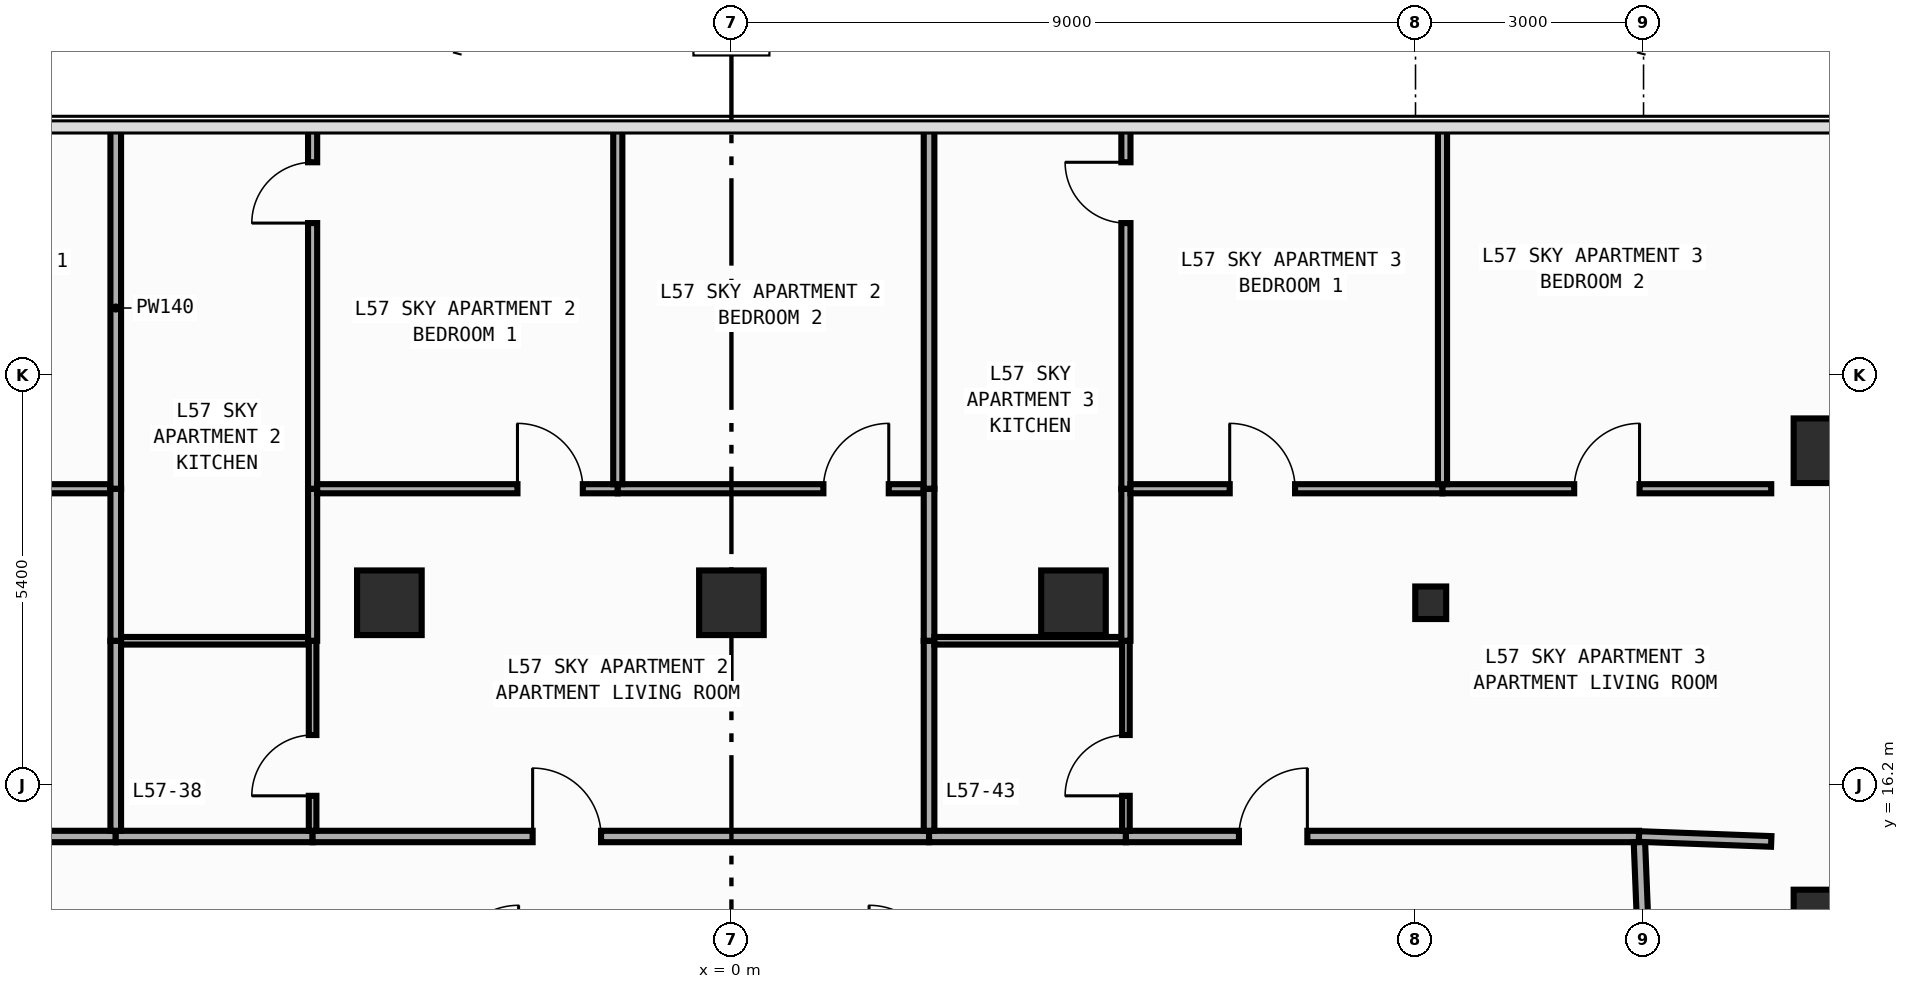
"""IFC4 building model, lengths in metres.
Left out: names, types, materials, properties, quantities, classifications, styles, units other than length and angle.
Written with IfcOpenShell. Run it as: python <this file> out.ifc"""

import sys

from ifc_helpers import new_model, si_unit, direction, frame, frame_2d, origin, origin_2d, place, context, subcontext, project, spatial, rectangle, i_section, extrude, element, fill, save


model = new_model("IFC4")
c1 = context("Model", 3, precision=1e-05, world=origin(), true_north=direction((0.0, 1.0)))
c2 = subcontext(c1, "Body", "Model", "MODEL_VIEW")
j1 = project(units=[si_unit("LENGTHUNIT", "METRE"), si_unit("PLANEANGLEUNIT", "RADIAN")], contexts=[c1])
p1 = place(None, origin())
s1 = spatial("IfcSite", under=j1, at=p1, CompositionType="ELEMENT")
p2 = place(p1, origin())
s2 = spatial("IfcBuilding", under=s1, at=p2, CompositionType="ELEMENT")
p3 = place(p2, frame((0.0, 0.0, 244.0)))
s3 = spatial("IfcBuildingStorey", under=s2, at=p3, CompositionType="ELEMENT", Elevation=244.0)
p4 = place(p3, frame((9.2, 18.6, 0.0), z_axis=(0.0, 0.0, 1.0), x_axis=(1.0, 0.0, 0.0)))
e1 = element("IfcColumn", 1, at=p4, inside=s3, PredefinedType="COLUMN", context=c2, shape_type="SweptSolid", body=[
    extrude(i_section(OverallWidth=0.407, OverallDepth=0.428, WebThickness=0.02, FlangeThickness=0.035, FilletRadius=0.022, at=origin_2d()), origin(), (0.0, 0.0, 1.0), 3.6),
])
for number, where, z_axis, x_axis in (
    (2, (14.4, 14.4, 0.0), (0.0, 0.0, 1.0), (1.0, 0.0, 0.0)),
    (3, (-4.5, 18.6, 0.0), (0.0, 0.0, 1.0), (1.0, 0.0, 0.0)),
    (4, (0.0, 18.6, 0.0), (0.0, 0.0, 1.0), (1.0, 0.0, 0.0)),
    (5, (4.5, 18.6, 0.0), (0.0, 0.0, 1.0), (1.0, 0.0, 0.0)),
    (6, (14.4, 20.6, 0.0), (0.0, 0.0, 1.0), (1.0, 0.0, 0.0)),
):
    element("IfcColumn", number, at=place(p3, frame(where, z_axis=z_axis, x_axis=x_axis)), inside=s3, PredefinedType="COLUMN", context=c2, shape_type="SweptSolid", body=[
        extrude(rectangle(XDim=0.85, YDim=0.85, at=origin_2d()), origin(), (0.0, 0.0, 1.0), 3.6),
    ])
p5 = place(p3, frame((-19.31, 15.525, 0.0), z_axis=(0.0, 0.0, 1.0), x_axis=(1.0, 0.0, 0.0)))
e7 = element("IfcWall", 7, at=p5, inside=s3, PredefinedType="PARTITIONING", context=c2, shape_type="SweptSolid", body=[
    extrude(rectangle(XDim=11.21, YDim=0.15, at=frame_2d((5.605, 0.0))), origin(), (0.0, 0.0, 1.0), 3.34),
])
p6 = place(p5, frame((1.481, 0.0, 0.0)))
e8 = element("IfcOpeningElement", 8, at=p6, cuts=e7, PredefinedType="OPENING", context=c2, shape_type="SweptSolid", body=[
    extrude(rectangle(XDim=0.9, YDim=2.15, at=frame_2d((0.45, 1.075))), frame((0.0, 0.085, 0.0), z_axis=(0.0, -1.0, 0.0), x_axis=(1.0, 0.0, 0.0)), (0.0, 0.0, 1.0), 0.17),
])
p7 = place(p3, frame((-8.1, 15.525, 0.0), z_axis=(0.0, 0.0, 1.0), x_axis=(1.0, 0.0, 0.0)))
e9 = element("IfcWall", 9, at=p7, inside=s3, PredefinedType="PARTITIONING", context=c2, shape_type="SweptSolid", body=[
    extrude(rectangle(XDim=2.59, YDim=0.15, at=frame_2d((1.295, 0.0))), origin(), (0.0, 0.0, 1.0), 3.34),
])
p8 = place(p3, frame((-5.51, 15.525, 0.0), z_axis=(0.0, 0.0, 1.0), x_axis=(1.0, 0.0, 0.0)))
e10 = element("IfcWall", 10, at=p8, inside=s3, PredefinedType="PARTITIONING", context=c2, shape_type="SweptSolid", body=[
    extrude(rectangle(XDim=8.11, YDim=0.15, at=frame_2d((4.055, 0.0))), origin(), (0.0, 0.0, 1.0), 3.34),
])
p9 = place(p8, frame((2.895, 0.0, 0.0)))
e11 = element("IfcOpeningElement", 11, at=p9, cuts=e10, PredefinedType="OPENING", context=c2, shape_type="SweptSolid", body=[
    extrude(rectangle(XDim=0.9, YDim=2.15, at=frame_2d((0.45, 1.075))), frame((0.0, 0.085, 0.0), z_axis=(0.0, -1.0, 0.0), x_axis=(1.0, 0.0, 0.0)), (0.0, 0.0, 1.0), 0.17),
])
p10 = place(p3, frame((2.6, 15.525, 0.0), z_axis=(0.0, 0.0, 1.0), x_axis=(1.0, 0.0, 0.0)))
e12 = element("IfcWall", 12, at=p10, inside=s3, PredefinedType="PARTITIONING", context=c2, shape_type="SweptSolid", body=[
    extrude(rectangle(XDim=2.59, YDim=0.15, at=frame_2d((1.295, 0.0))), origin(), (0.0, 0.0, 1.0), 3.34),
])
p11 = place(p3, frame((5.19, 15.525, 0.0), z_axis=(0.0, 0.0, 1.0), x_axis=(1.0, 0.0, 0.0)))
e13 = element("IfcWall", 13, at=p11, inside=s3, PredefinedType="PARTITIONING", context=c2, shape_type="SweptSolid", body=[
    extrude(rectangle(XDim=6.75, YDim=0.15, at=frame_2d((3.375, 0.0))), origin(), (0.0, 0.0, 1.0), 3.34),
])
p12 = place(p11, frame((1.487, 0.0, 0.0)))
e14 = element("IfcOpeningElement", 14, at=p12, cuts=e13, PredefinedType="OPENING", context=c2, shape_type="SweptSolid", body=[
    extrude(rectangle(XDim=0.9, YDim=2.15, at=frame_2d((0.45, 1.075))), frame((0.0, 0.085, 0.0), z_axis=(0.0, -1.0, 0.0), x_axis=(1.0, 0.0, 0.0)), (0.0, 0.0, 1.0), 0.17),
])
p13 = place(p3, frame((12.015, 13.72, 0.0), z_axis=(0.0, 0.0, 1.0), x_axis=(-0.040046877756, 0.99919780203, 0.0)))
e15 = element("IfcWall", 15, at=p13, inside=s3, PredefinedType="PARTITIONING", context=c2, shape_type="SweptSolid", body=[
    extrude(rectangle(XDim=1.731, YDim=0.15, at=frame_2d((0.866, 0.0))), origin(), (0.0, 0.0, 1.0), 3.34),
])
p14 = place(p3, frame((-13.745, 20.1, 0.0), z_axis=(0.0, 0.0, 1.0), x_axis=(1.0, 0.0, 0.0)))
e16 = element("IfcWall", 16, at=p14, inside=s3, PredefinedType="PARTITIONING", context=c2, shape_type="SweptSolid", body=[
    extrude(rectangle(XDim=5.575, YDim=0.12, at=frame_2d((2.788, 0.0))), origin(), (0.0, 0.0, 1.0), 3.34),
])
p15 = place(p14, frame((1.725, 0.0, 0.0)))
e17 = element("IfcOpeningElement", 17, at=p15, cuts=e16, PredefinedType="OPENING", context=c2, shape_type="SweptSolid", body=[
    extrude(rectangle(XDim=0.86, YDim=2.15, at=frame_2d((0.43, 1.075))), frame((0.0, 0.07, 0.0), z_axis=(0.0, -1.0, 0.0), x_axis=(1.0, 0.0, 0.0)), (0.0, 0.0, 1.0), 0.14),
])
p16 = place(p3, frame((-8.1, 15.6, 0.0), z_axis=(0.0, 0.0, 1.0), x_axis=(0.0, 1.0, 0.0)))
e18 = element("IfcWall", 18, at=p16, inside=s3, PredefinedType="PARTITIONING", context=c2, shape_type="SweptSolid", body=[
    extrude(rectangle(XDim=2.5, YDim=0.14, at=frame_2d((1.25, 0.0))), origin(), (0.0, 0.0, 1.0), 3.34),
])
p17 = place(p3, frame((-8.1, 18.1, 0.0), z_axis=(0.0, 0.0, 1.0), x_axis=(0.0, 1.0, 0.0)))
e19 = element("IfcWall", 19, at=p17, inside=s3, PredefinedType="PARTITIONING", context=c2, shape_type="SweptSolid", body=[
    extrude(rectangle(XDim=2.0, YDim=0.14, at=frame_2d((1.0, 0.0))), origin(), (0.0, 0.0, 1.0), 3.34),
])
p18 = place(p3, frame((-8.1, 20.1, 0.0), z_axis=(0.0, 0.0, 1.0), x_axis=(0.0, 1.0, 0.0)))
e20 = element("IfcWall", 20, at=p18, inside=s3, PredefinedType="PARTITIONING", context=c2, shape_type="SweptSolid", body=[
    extrude(rectangle(XDim=4.755, YDim=0.14, at=frame_2d((2.377, 0.0))), origin(), (0.0, 0.0, 1.0), 3.34),
])
p19 = place(p3, frame((-8.03, 18.1, 0.0), z_axis=(0.0, 0.0, 1.0), x_axis=(1.0, 0.0, 0.0)))
e21 = element("IfcWall", 21, at=p19, inside=s3, PredefinedType="PARTITIONING", context=c2, shape_type="SweptSolid", body=[
    extrude(rectangle(XDim=2.47, YDim=0.1, at=frame_2d((1.235, 0.0))), origin(), (0.0, 0.0, 1.0), 3.34),
])
p20 = place(p3, frame((-5.51, 15.6, 0.0), z_axis=(0.0, 0.0, 1.0), x_axis=(0.0, 1.0, 0.0)))
e22 = element("IfcWall", 22, at=p20, inside=s3, PredefinedType="PARTITIONING", context=c2, shape_type="SweptSolid", body=[
    extrude(rectangle(XDim=2.5, YDim=0.1, at=frame_2d((1.25, 0.0))), origin(), (0.0, 0.0, 1.0), 3.34),
])
p21 = place(p20, frame((0.46, 0.0, 0.0)))
e23 = element("IfcOpeningElement", 23, at=p21, cuts=e22, PredefinedType="OPENING", context=c2, shape_type="SweptSolid", body=[
    extrude(rectangle(XDim=0.8, YDim=2.1, at=frame_2d((0.4, 1.05))), frame((0.0, 0.06, 0.0), z_axis=(0.0, -1.0, 0.0), x_axis=(1.0, 0.0, 0.0)), (0.0, 0.0, 1.0), 0.12),
])
p22 = place(p3, frame((-5.51, 18.1, 0.0), z_axis=(0.0, 0.0, 1.0), x_axis=(0.0, 1.0, 0.0)))
e24 = element("IfcWall", 24, at=p22, inside=s3, PredefinedType="PARTITIONING", context=c2, shape_type="SweptSolid", body=[
    extrude(rectangle(XDim=2.0, YDim=0.12, at=frame_2d((1.0, 0.0))), origin(), (0.0, 0.0, 1.0), 3.34),
])
p23 = place(p3, frame((-5.51, 20.1, 0.0), z_axis=(0.0, 0.0, 1.0), x_axis=(0.0, 1.0, 0.0)))
e25 = element("IfcWall", 25, at=p23, inside=s3, PredefinedType="PARTITIONING", context=c2, shape_type="SweptSolid", body=[
    extrude(rectangle(XDim=4.755, YDim=0.12, at=frame_2d((2.377, 0.0))), origin(), (0.0, 0.0, 1.0), 3.34),
])
p24 = place(p23, frame((3.495, 0.0, 0.0)))
e26 = element("IfcOpeningElement", 26, at=p24, cuts=e25, PredefinedType="OPENING", context=c2, shape_type="SweptSolid", body=[
    extrude(rectangle(XDim=0.8, YDim=2.1, at=frame_2d((0.4, 1.05))), frame((0.0, 0.07, 0.0), z_axis=(0.0, -1.0, 0.0), x_axis=(1.0, 0.0, 0.0)), (0.0, 0.0, 1.0), 0.14),
])
p25 = place(p3, frame((-5.45, 20.1, 0.0), z_axis=(0.0, 0.0, 1.0), x_axis=(1.0, 0.0, 0.0)))
e27 = element("IfcWall", 27, at=p25, inside=s3, PredefinedType="PARTITIONING", context=c2, shape_type="SweptSolid", body=[
    extrude(rectangle(XDim=3.955, YDim=0.12, at=frame_2d((1.978, 0.0))), origin(), (0.0, 0.0, 1.0), 3.34),
])
p26 = place(p25, frame((2.635, 0.0, 0.0)))
e28 = element("IfcOpeningElement", 28, at=p26, cuts=e27, PredefinedType="OPENING", context=c2, shape_type="SweptSolid", body=[
    extrude(rectangle(XDim=0.86, YDim=2.15, at=frame_2d((0.43, 1.075))), frame((0.0, 0.07, 0.0), z_axis=(0.0, -1.0, 0.0), x_axis=(1.0, 0.0, 0.0)), (0.0, 0.0, 1.0), 0.14),
])
p27 = place(p3, frame((-1.495, 20.1, 0.0), z_axis=(0.0, 0.0, 1.0), x_axis=(1.0, 0.0, 0.0)))
e29 = element("IfcWall", 29, at=p27, inside=s3, PredefinedType="PARTITIONING", context=c2, shape_type="SweptSolid", body=[
    extrude(rectangle(XDim=4.025, YDim=0.12, at=frame_2d((2.013, 0.0))), origin(), (0.0, 0.0, 1.0), 3.34),
])
p28 = place(p27, frame((2.705, 0.0, 0.0)))
e30 = element("IfcOpeningElement", 30, at=p28, cuts=e29, PredefinedType="OPENING", context=c2, shape_type="SweptSolid", body=[
    extrude(rectangle(XDim=0.86, YDim=2.15, at=frame_2d((0.43, 1.075))), frame((0.0, 0.07, 0.0), z_axis=(0.0, -1.0, 0.0), x_axis=(1.0, 0.0, 0.0)), (0.0, 0.0, 1.0), 0.14),
])
p29 = place(p3, frame((2.6, 15.6, 0.0), z_axis=(0.0, 0.0, 1.0), x_axis=(0.0, 1.0, 0.0)))
e31 = element("IfcWall", 31, at=p29, inside=s3, PredefinedType="PARTITIONING", context=c2, shape_type="SweptSolid", body=[
    extrude(rectangle(XDim=2.5, YDim=0.14, at=frame_2d((1.25, 0.0))), origin(), (0.0, 0.0, 1.0), 3.34),
])
p30 = place(p3, frame((2.6, 18.1, 0.0), z_axis=(0.0, 0.0, 1.0), x_axis=(0.0, 1.0, 0.0)))
e32 = element("IfcWall", 32, at=p30, inside=s3, PredefinedType="PARTITIONING", context=c2, shape_type="SweptSolid", body=[
    extrude(rectangle(XDim=2.0, YDim=0.14, at=frame_2d((1.0, 0.0))), origin(), (0.0, 0.0, 1.0), 3.34),
])
p31 = place(p3, frame((-1.495, 20.16, 0.0), z_axis=(0.0, 0.0, 1.0), x_axis=(0.0, 1.0, 0.0)))
e33 = element("IfcWall", 33, at=p31, inside=s3, PredefinedType="PARTITIONING", context=c2, shape_type="SweptSolid", body=[
    extrude(rectangle(XDim=4.695, YDim=0.12, at=frame_2d((2.348, 0.0))), origin(), (0.0, 0.0, 1.0), 3.34),
])
p32 = place(p3, frame((2.6, 20.1, 0.0), z_axis=(0.0, 0.0, 1.0), x_axis=(0.0, 1.0, 0.0)))
e34 = element("IfcWall", 34, at=p32, inside=s3, PredefinedType="PARTITIONING", context=c2, shape_type="SweptSolid", body=[
    extrude(rectangle(XDim=4.755, YDim=0.14, at=frame_2d((2.377, 0.0))), origin(), (0.0, 0.0, 1.0), 3.34),
])
p33 = place(p3, frame((2.67, 18.1, 0.0), z_axis=(0.0, 0.0, 1.0), x_axis=(1.0, 0.0, 0.0)))
e35 = element("IfcWall", 35, at=p33, inside=s3, PredefinedType="PARTITIONING", context=c2, shape_type="SweptSolid", body=[
    extrude(rectangle(XDim=2.47, YDim=0.1, at=frame_2d((1.235, 0.0))), origin(), (0.0, 0.0, 1.0), 3.34),
])
p34 = place(p3, frame((5.19, 15.6, 0.0), z_axis=(0.0, 0.0, 1.0), x_axis=(0.0, 1.0, 0.0)))
e36 = element("IfcWall", 36, at=p34, inside=s3, PredefinedType="PARTITIONING", context=c2, shape_type="SweptSolid", body=[
    extrude(rectangle(XDim=2.5, YDim=0.1, at=frame_2d((1.25, 0.0))), origin(), (0.0, 0.0, 1.0), 3.34),
])
p35 = place(p34, frame((0.46, 0.0, 0.0)))
e37 = element("IfcOpeningElement", 37, at=p35, cuts=e36, PredefinedType="OPENING", context=c2, shape_type="SweptSolid", body=[
    extrude(rectangle(XDim=0.8, YDim=2.1, at=frame_2d((0.4, 1.05))), frame((0.0, 0.06, 0.0), z_axis=(0.0, -1.0, 0.0), x_axis=(1.0, 0.0, 0.0)), (0.0, 0.0, 1.0), 0.12),
])
p36 = place(p3, frame((5.19, 18.1, 0.0), z_axis=(0.0, 0.0, 1.0), x_axis=(0.0, 1.0, 0.0)))
e38 = element("IfcWall", 38, at=p36, inside=s3, PredefinedType="PARTITIONING", context=c2, shape_type="SweptSolid", body=[
    extrude(rectangle(XDim=2.0, YDim=0.12, at=frame_2d((1.0, 0.0))), origin(), (0.0, 0.0, 1.0), 3.34),
])
p37 = place(p3, frame((5.19, 20.1, 0.0), z_axis=(0.0, 0.0, 1.0), x_axis=(0.0, 1.0, 0.0)))
e39 = element("IfcWall", 39, at=p37, inside=s3, PredefinedType="PARTITIONING", context=c2, shape_type="SweptSolid", body=[
    extrude(rectangle(XDim=4.755, YDim=0.12, at=frame_2d((2.377, 0.0))), origin(), (0.0, 0.0, 1.0), 3.34),
])
p38 = place(p37, frame((3.495, 0.0, 0.0)))
e40 = element("IfcOpeningElement", 40, at=p38, cuts=e39, PredefinedType="OPENING", context=c2, shape_type="SweptSolid", body=[
    extrude(rectangle(XDim=0.8, YDim=2.1, at=frame_2d((0.4, 1.05))), frame((0.0, 0.07, 0.0), z_axis=(0.0, -1.0, 0.0), x_axis=(1.0, 0.0, 0.0)), (0.0, 0.0, 1.0), 0.14),
])
p39 = place(p3, frame((5.25, 20.1, 0.0), z_axis=(0.0, 0.0, 1.0), x_axis=(1.0, 0.0, 0.0)))
e41 = element("IfcWall", 41, at=p39, inside=s3, PredefinedType="PARTITIONING", context=c2, shape_type="SweptSolid", body=[
    extrude(rectangle(XDim=4.105, YDim=0.12, at=frame_2d((2.052, 0.0))), origin(), (0.0, 0.0, 1.0), 3.34),
])
p40 = place(p39, frame((1.305, 0.0, 0.0)))
e42 = element("IfcOpeningElement", 42, at=p40, cuts=e41, PredefinedType="OPENING", context=c2, shape_type="SweptSolid", body=[
    extrude(rectangle(XDim=0.86, YDim=2.15, at=frame_2d((0.43, 1.075))), frame((0.0, 0.07, 0.0), z_axis=(0.0, -1.0, 0.0), x_axis=(1.0, 0.0, 0.0)), (0.0, 0.0, 1.0), 0.14),
])
p41 = place(p3, frame((9.355, 20.1, 0.0), z_axis=(0.0, 0.0, 1.0), x_axis=(1.0, 0.0, 0.0)))
e43 = element("IfcWall", 43, at=p41, inside=s3, PredefinedType="PARTITIONING", context=c2, shape_type="SweptSolid", body=[
    extrude(rectangle(XDim=4.325, YDim=0.12, at=frame_2d((2.163, 0.0))), origin(), (0.0, 0.0, 1.0), 3.34),
])
p42 = place(p41, frame((1.732, 0.0, 0.0)))
e44 = element("IfcOpeningElement", 44, at=p42, cuts=e43, PredefinedType="OPENING", context=c2, shape_type="SweptSolid", body=[
    extrude(rectangle(XDim=0.86, YDim=2.15, at=frame_2d((0.43, 1.075))), frame((0.0, 0.07, 0.0), z_axis=(0.0, -1.0, 0.0), x_axis=(1.0, 0.0, 0.0)), (0.0, 0.0, 1.0), 0.14),
])
p43 = place(p3, frame((11.94, 15.525, 0.0), z_axis=(0.0, 0.0, 1.0), x_axis=(0.999304229002, -0.037296888581, 0.0)))
e45 = element("IfcWall", 45, at=p43, inside=s3, PredefinedType="PARTITIONING", context=c2, shape_type="SweptSolid", body=[
    extrude(rectangle(XDim=1.741, YDim=0.14, at=frame_2d((0.871, 0.0))), origin(), (0.0, 0.0, 1.0), 3.34),
])
p44 = place(p3, frame((9.355, 20.16, 0.0), z_axis=(0.0, 0.0, 1.0), x_axis=(0.0, 1.0, 0.0)))
e46 = element("IfcWall", 46, at=p44, inside=s3, PredefinedType="PARTITIONING", context=c2, shape_type="SweptSolid", body=[
    extrude(rectangle(XDim=4.695, YDim=0.12, at=frame_2d((2.348, 0.0))), origin(), (0.0, 0.0, 1.0), 3.34),
])
p45 = place(p9, origin())
e47 = element("IfcDoor", 47, at=p45, inside=s3, OperationType="SINGLE_SWING_LEFT", PredefinedType="DOOR", context=c2, shape_type="SweptSolid", body=[
    extrude(rectangle(XDim=0.9, YDim=2.15, at=frame_2d((0.45, 1.075))), frame((0.0, 0.025, 0.0), z_axis=(0.0, -1.0, 0.0), x_axis=(1.0, 0.0, 0.0)), (0.0, 0.0, 1.0), 0.05),
])
fill(e11, e47)
p46 = place(p12, origin())
e48 = element("IfcDoor", 48, at=p46, inside=s3, OperationType="SINGLE_SWING_RIGHT", PredefinedType="DOOR", context=c2, shape_type="SweptSolid", body=[
    extrude(rectangle(XDim=0.9, YDim=2.15, at=frame_2d((0.45, 1.075))), frame((0.0, 0.025, 0.0), z_axis=(0.0, -1.0, 0.0), x_axis=(1.0, 0.0, 0.0)), (0.0, 0.0, 1.0), 0.05),
])
fill(e14, e48)
p47 = place(p21, origin())
e49 = element("IfcDoor", 49, at=p47, inside=s3, OperationType="SINGLE_SWING_LEFT", PredefinedType="DOOR", context=c2, shape_type="SweptSolid", body=[
    extrude(rectangle(XDim=0.8, YDim=2.1, at=frame_2d((0.4, 1.05))), frame((0.0, 0.025, 0.0), z_axis=(0.0, -1.0, 0.0), x_axis=(1.0, 0.0, 0.0)), (0.0, 0.0, 1.0), 0.05),
])
fill(e23, e49)
p48 = place(p26, origin())
e50 = element("IfcDoor", 50, at=p48, inside=s3, OperationType="SINGLE_SWING_LEFT", PredefinedType="DOOR", context=c2, shape_type="SweptSolid", body=[
    extrude(rectangle(XDim=0.86, YDim=2.15, at=frame_2d((0.43, 1.075))), frame((0.0, 0.025, 0.0), z_axis=(0.0, -1.0, 0.0), x_axis=(1.0, 0.0, 0.0)), (0.0, 0.0, 1.0), 0.05),
])
fill(e28, e50)
p49 = place(p28, origin())
e51 = element("IfcDoor", 51, at=p49, inside=s3, OperationType="SINGLE_SWING_RIGHT", PredefinedType="DOOR", context=c2, shape_type="SweptSolid", body=[
    extrude(rectangle(XDim=0.86, YDim=2.15, at=frame_2d((0.43, 1.075))), frame((0.0, 0.025, 0.0), z_axis=(0.0, -1.0, 0.0), x_axis=(1.0, 0.0, 0.0)), (0.0, 0.0, 1.0), 0.05),
])
fill(e30, e51)
p50 = place(p35, origin())
e52 = element("IfcDoor", 52, at=p50, inside=s3, OperationType="SINGLE_SWING_LEFT", PredefinedType="DOOR", context=c2, shape_type="SweptSolid", body=[
    extrude(rectangle(XDim=0.8, YDim=2.1, at=frame_2d((0.4, 1.05))), frame((0.0, 0.025, 0.0), z_axis=(0.0, -1.0, 0.0), x_axis=(1.0, 0.0, 0.0)), (0.0, 0.0, 1.0), 0.05),
])
fill(e37, e52)
p51 = place(p40, origin())
e53 = element("IfcDoor", 53, at=p51, inside=s3, OperationType="SINGLE_SWING_LEFT", PredefinedType="DOOR", context=c2, shape_type="SweptSolid", body=[
    extrude(rectangle(XDim=0.86, YDim=2.15, at=frame_2d((0.43, 1.075))), frame((0.0, 0.025, 0.0), z_axis=(0.0, -1.0, 0.0), x_axis=(1.0, 0.0, 0.0)), (0.0, 0.0, 1.0), 0.05),
])
fill(e42, e53)
p52 = place(p42, origin())
e54 = element("IfcDoor", 54, at=p52, inside=s3, OperationType="SINGLE_SWING_RIGHT", PredefinedType="DOOR", context=c2, shape_type="SweptSolid", body=[
    extrude(rectangle(XDim=0.86, YDim=2.15, at=frame_2d((0.43, 1.075))), frame((0.0, 0.025, 0.0), z_axis=(0.0, -1.0, 0.0), x_axis=(1.0, 0.0, 0.0)), (0.0, 0.0, 1.0), 0.05),
])
fill(e44, e54)
p53 = place(p24, origin())
e55 = element("IfcDoor", 55, at=p53, inside=s3, OperationType="SINGLE_SWING_LEFT", PredefinedType="DOOR", context=c2, shape_type="SweptSolid", body=[
    extrude(rectangle(XDim=0.8, YDim=2.1, at=frame_2d((0.4, 1.05))), frame((0.0, 0.025, 0.0), z_axis=(0.0, -1.0, 0.0), x_axis=(1.0, 0.0, 0.0)), (0.0, 0.0, 1.0), 0.05),
])
fill(e26, e55)
p54 = place(p38, origin())
e56 = element("IfcDoor", 56, at=p54, inside=s3, OperationType="SINGLE_SWING_RIGHT", PredefinedType="DOOR", context=c2, shape_type="SweptSolid", body=[
    extrude(rectangle(XDim=0.8, YDim=2.1, at=frame_2d((0.4, 1.05))), frame((0.0, 0.025, 0.0), z_axis=(0.0, -1.0, 0.0), x_axis=(1.0, 0.0, 0.0)), (0.0, 0.0, 1.0), 0.05),
])
fill(e40, e56)
save(model, sys.argv[1])
